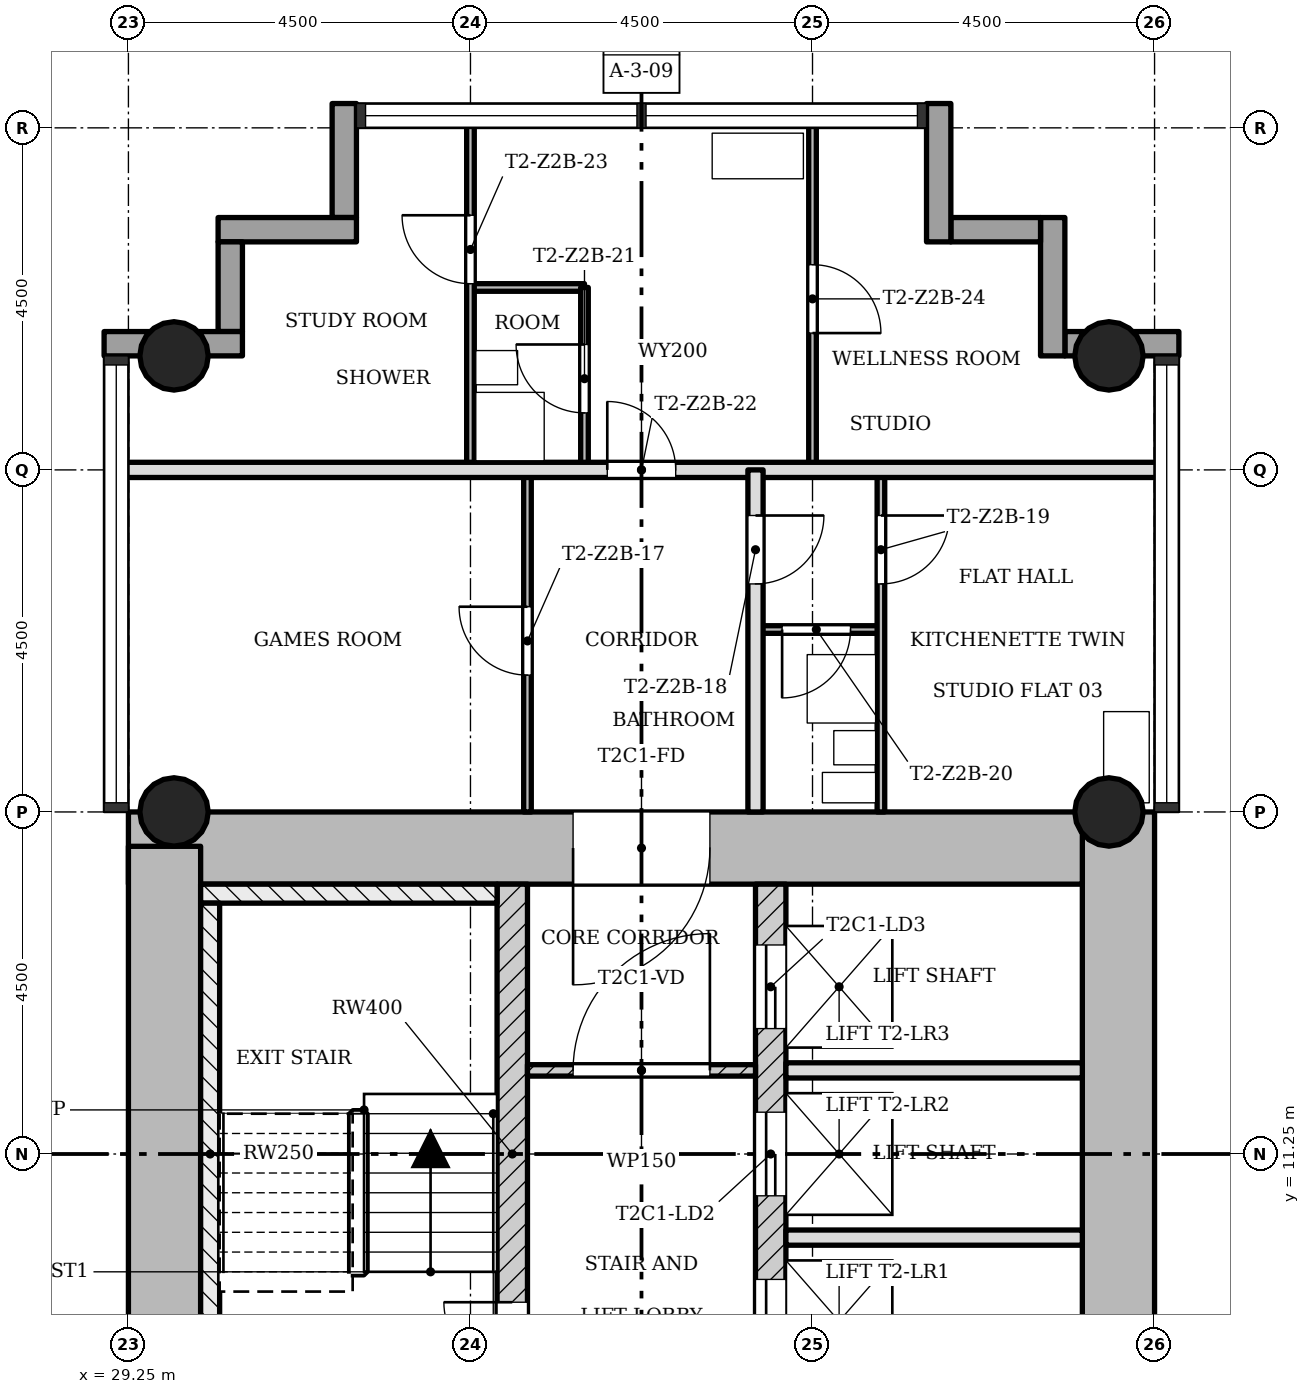
"""IFC4 building model, lengths in metres.
Left out: names, types, materials, properties, quantities, classifications, styles, units other than length and angle.
Written with IfcOpenShell. Run it as: python <this file> out.ifc"""

import sys

from ifc_helpers import new_model, si_unit, direction, frame, frame_2d, origin, origin_2d, place, context, subcontext, project, spatial, rectangle, hollow_circle, extrude, element, fill, save


model = new_model("IFC4")
c1 = context("Model", 3, precision=1e-05, world=origin(), true_north=direction((0.0, 1.0)))
c2 = subcontext(c1, "Body", "Model", "MODEL_VIEW")
j1 = project(units=[si_unit("LENGTHUNIT", "METRE"), si_unit("PLANEANGLEUNIT", "RADIAN")], contexts=[c1])
p1 = place(None, origin())
s1 = spatial("IfcSite", under=j1, at=p1, CompositionType="ELEMENT")
p2 = place(p1, origin())
s2 = spatial("IfcBuilding", under=s1, at=p2, CompositionType="ELEMENT")
p3 = place(p2, frame((0.0, 0.0, 83.4)))
s3 = spatial("IfcBuildingStorey", under=s2, at=p3, CompositionType="ELEMENT", Elevation=83.4)
p4 = place(p3, frame((42.275, 7.7, 0.0), z_axis=(0.0, 0.0, 1.0), x_axis=(0.0, 1.0, 0.0)))
e1 = element("IfcWall", 1, at=p4, inside=s3, PredefinedType="SHEAR", context=c2, shape_type="SweptSolid", body=[
    extrude(rectangle(XDim=8.05, YDim=0.95, at=frame_2d((4.025, 0.0))), origin(), (0.0, 0.0, 1.0), 3.4),
])
p5 = place(p3, frame((41.8, 15.275, 0.0), z_axis=(0.0, 0.0, 1.0), x_axis=(-1.0, 0.0, 0.0)))
e2 = element("IfcWall", 2, at=p5, inside=s3, PredefinedType="SHEAR", context=c2, shape_type="SweptSolid", body=[
    extrude(rectangle(XDim=12.55, YDim=0.95, at=frame_2d((6.275, 0.0))), origin(), (0.0, 0.0, 1.0), 3.4),
])
p6 = place(p5, frame((4.9, 0.0, 0.0)))
e3 = element("IfcOpeningElement", 3, at=p6, cuts=e2, PredefinedType="OPENING", context=c2, shape_type="SweptSolid", body=[
    extrude(rectangle(XDim=1.8, YDim=2.1, at=frame_2d((0.9, 1.05))), frame((0.0, 0.485, 0.0), z_axis=(0.0, -1.0, 0.0), x_axis=(1.0, 0.0, 0.0)), (0.0, 0.0, 1.0), 0.97),
])
p7 = place(p3, frame((29.725, 15.298, 0.0), z_axis=(0.0, 0.0, 1.0), x_axis=(0.0, -1.0, 0.0)))
e4 = element("IfcWall", 4, at=p7, inside=s3, PredefinedType="SHEAR", context=c2, shape_type="SweptSolid", body=[
    extrude(rectangle(XDim=8.696, YDim=0.95, at=frame_2d((4.348, 0.0))), origin(), (0.0, 0.0, 1.0), 3.4),
])
p8 = place(p3, frame((34.3, 7.7, 0.0), z_axis=(0.0, 0.0, 1.0), x_axis=(0.0, 1.0, 0.0)))
e5 = element("IfcWall", 5, at=p8, inside=s3, PredefinedType="SHEAR", context=c2, shape_type="SweptSolid", body=[
    extrude(rectangle(XDim=7.1, YDim=0.4, at=frame_2d((3.55, 0.0))), origin(), (0.0, 0.0, 1.0), 3.4),
])
p9 = place(p8, frame((0.7, 0.0, 0.0)))
e6 = element("IfcOpeningElement", 6, at=p9, cuts=e5, PredefinedType="OPENING", context=c2, shape_type="SweptSolid", body=[
    extrude(rectangle(XDim=0.9, YDim=2.1, at=frame_2d((0.45, 1.05))), frame((0.0, 0.21, 0.0), z_axis=(0.0, -1.0, 0.0), x_axis=(1.0, 0.0, 0.0)), (0.0, 0.0, 1.0), 0.42),
])
p10 = place(p3, frame((37.7, 7.7, 0.0), z_axis=(0.0, 0.0, 1.0), x_axis=(0.0, 1.0, 0.0)))
e7 = element("IfcWall", 7, at=p10, inside=s3, PredefinedType="SHEAR", context=c2, shape_type="SweptSolid", body=[
    extrude(rectangle(XDim=7.1, YDim=0.4, at=frame_2d((3.55, 0.0))), origin(), (0.0, 0.0, 1.0), 3.4),
])
p11 = place(p10, frame((0.8, 0.0, 0.0)))
e8 = element("IfcOpeningElement", 8, at=p11, cuts=e7, PredefinedType="OPENING", context=c2, shape_type="SweptSolid", body=[
    extrude(rectangle(XDim=1.1, YDim=2.1, at=frame_2d((0.55, 1.05))), frame((0.0, 0.21, 0.0), z_axis=(0.0, -1.0, 0.0), x_axis=(1.0, 0.0, 0.0)), (0.0, 0.0, 1.0), 0.42),
])
p12 = place(p10, frame((3.0, 0.0, 0.0)))
e9 = element("IfcOpeningElement", 9, at=p12, cuts=e7, PredefinedType="OPENING", context=c2, shape_type="SweptSolid", body=[
    extrude(rectangle(XDim=1.1, YDim=2.1, at=frame_2d((0.55, 1.05))), frame((0.0, 0.21, 0.0), z_axis=(0.0, -1.0, 0.0), x_axis=(1.0, 0.0, 0.0)), (0.0, 0.0, 1.0), 0.42),
])
p13 = place(p10, frame((5.2, 0.0, 0.0)))
e10 = element("IfcOpeningElement", 10, at=p13, cuts=e7, PredefinedType="OPENING", context=c2, shape_type="SweptSolid", body=[
    extrude(rectangle(XDim=1.1, YDim=2.1, at=frame_2d((0.55, 1.05))), frame((0.0, 0.21, 0.0), z_axis=(0.0, -1.0, 0.0), x_axis=(1.0, 0.0, 0.0)), (0.0, 0.0, 1.0), 0.42),
])
for number, where, z_axis, x_axis in (
    (11, (42.15, 15.75, 0.0), (0.0, 0.0, 1.0), (1.0, 0.0, 0.0)),
    (12, (29.85, 15.75, 0.0), (0.0, 0.0, 1.0), (1.0, 0.0, 0.0)),
    (13, (42.15, 21.75, 0.0), (0.0, 0.0, 1.0), (1.0, 0.0, 0.0)),
    (14, (29.85, 21.75, 0.0), (0.0, 0.0, 1.0), (1.0, 0.0, 0.0)),
):
    element("IfcColumn", number, at=place(p3, frame(where, z_axis=z_axis, x_axis=x_axis)), inside=s3, PredefinedType="COLUMN", context=c2, shape_type="SweptSolid", body=[
        extrude(hollow_circle(Radius=0.45, WallThickness=0.032, at=origin_2d()), origin(), (0.0, 0.0, 1.0), 3.4),
    ])
p14 = place(p3, frame((43.07, 21.91, -0.3), z_axis=(0.0, 0.0, 1.0), x_axis=(-1.0, 0.0, 0.0)))
e15 = element("IfcWall", 15, at=p14, inside=s3, PredefinedType="STANDARD", context=c2, shape_type="SweptSolid", body=[
    extrude(rectangle(XDim=1.5, YDim=0.32, at=frame_2d((0.75, 0.0))), origin(), (0.0, 0.0, 1.0), 3.4),
])
p15 = place(p3, frame((41.41, 21.75, -0.3), z_axis=(0.0, 0.0, 1.0), x_axis=(0.0, 1.0, 0.0)))
e16 = element("IfcWall", 16, at=p15, inside=s3, PredefinedType="STANDARD", context=c2, shape_type="SweptSolid", body=[
    extrude(rectangle(XDim=1.82, YDim=0.32, at=frame_2d((0.91, 0.0))), origin(), (0.0, 0.0, 1.0), 3.4),
])
p16 = place(p3, frame((41.25, 23.41, -0.3), z_axis=(0.0, 0.0, 1.0), x_axis=(-1.0, 0.0, 0.0)))
e17 = element("IfcWall", 17, at=p16, inside=s3, PredefinedType="STANDARD", context=c2, shape_type="SweptSolid", body=[
    extrude(rectangle(XDim=1.18, YDim=0.32, at=frame_2d((0.59, 0.0))), origin(), (0.0, 0.0, 1.0), 3.4),
])
p17 = place(p3, frame((39.91, 23.25, -0.3), z_axis=(0.0, 0.0, 1.0), x_axis=(0.0, 1.0, 0.0)))
e18 = element("IfcWall", 18, at=p17, inside=s3, PredefinedType="STANDARD", context=c2, shape_type="SweptSolid", body=[
    extrude(rectangle(XDim=1.82, YDim=0.32, at=frame_2d((0.91, 0.0))), origin(), (0.0, 0.0, 1.0), 3.4),
])
p18 = place(p3, frame((32.09, 25.07, -0.3), z_axis=(0.0, 0.0, 1.0), x_axis=(0.0, -1.0, 0.0)))
e19 = element("IfcWall", 19, at=p18, inside=s3, PredefinedType="STANDARD", context=c2, shape_type="SweptSolid", body=[
    extrude(rectangle(XDim=1.5, YDim=0.32, at=frame_2d((0.75, 0.0))), origin(), (0.0, 0.0, 1.0), 3.4),
])
p19 = place(p3, frame((32.25, 23.41, -0.3), z_axis=(0.0, 0.0, 1.0), x_axis=(-1.0, 0.0, 0.0)))
e20 = element("IfcWall", 20, at=p19, inside=s3, PredefinedType="STANDARD", context=c2, shape_type="SweptSolid", body=[
    extrude(rectangle(XDim=1.82, YDim=0.32, at=frame_2d((0.91, 0.0))), origin(), (0.0, 0.0, 1.0), 3.4),
])
p20 = place(p3, frame((30.59, 23.25, -0.3), z_axis=(0.0, 0.0, 1.0), x_axis=(0.0, -1.0, 0.0)))
e21 = element("IfcWall", 21, at=p20, inside=s3, PredefinedType="STANDARD", context=c2, shape_type="SweptSolid", body=[
    extrude(rectangle(XDim=1.18, YDim=0.32, at=frame_2d((0.59, 0.0))), origin(), (0.0, 0.0, 1.0), 3.4),
])
p21 = place(p3, frame((30.75, 21.91, -0.3), z_axis=(0.0, 0.0, 1.0), x_axis=(-1.0, 0.0, 0.0)))
e22 = element("IfcWall", 22, at=p21, inside=s3, PredefinedType="STANDARD", context=c2, shape_type="SweptSolid", body=[
    extrude(rectangle(XDim=1.82, YDim=0.32, at=frame_2d((0.91, 0.0))), origin(), (0.0, 0.0, 1.0), 3.4),
])
p22 = place(p3, frame((37.5, 12.35, 0.0), z_axis=(0.0, 0.0, 1.0), x_axis=(-1.0, 0.0, 0.0)))
e23 = element("IfcWall", 23, at=p22, inside=s3, PredefinedType="PARTITIONING", context=c2, shape_type="SweptSolid", body=[
    extrude(rectangle(XDim=3.0, YDim=0.15, at=frame_2d((1.5, 0.0))), origin(), (0.0, 0.0, 1.0), 3.0),
])
p23 = place(p22, frame((0.6, 0.0, 0.0)))
e24 = element("IfcOpeningElement", 24, at=p23, cuts=e23, PredefinedType="OPENING", context=c2, shape_type="SweptSolid", body=[
    extrude(rectangle(XDim=1.8, YDim=2.1, at=frame_2d((0.9, 1.05))), frame((0.0, 0.085, 0.0), z_axis=(0.0, -1.0, 0.0), x_axis=(1.0, 0.0, 0.0)), (0.0, 0.0, 1.0), 0.17),
])
for number, where, z_axis, x_axis in (
    (25, (41.8, 10.15, 0.0), (0.0, 0.0, 1.0), (-1.0, 0.0, 0.0)),
    (26, (41.8, 12.35, 0.0), (0.0, 0.0, 1.0), (-1.0, 0.0, 0.0)),
):
    element("IfcWall", number, at=place(p3, frame(where, z_axis=z_axis, x_axis=x_axis)), inside=s3, PredefinedType="SOLIDWALL", context=c2, shape_type="SweptSolid", body=[
        extrude(rectangle(XDim=3.9, YDim=0.2, at=frame_2d((1.95, 0.0))), origin(), (0.0, 0.0, 1.0), 3.0),
    ])
p24 = place(p3, frame((39.15, 18.15, 0.0), z_axis=(0.0, 0.0, 1.0), x_axis=(-1.0, 0.0, 0.0)))
e27 = element("IfcWall", 27, at=p24, inside=s3, PredefinedType="PARTITIONING", context=c2, shape_type="SweptSolid", body=[
    extrude(rectangle(XDim=1.65, YDim=0.1, at=frame_2d((0.825, 0.0))), origin(), (0.0, 0.0, 1.0), 3.0),
])
p25 = place(p24, frame((0.4, 0.0, 0.0)))
e28 = element("IfcOpeningElement", 28, at=p25, cuts=e27, PredefinedType="OPENING", context=c2, shape_type="SweptSolid", body=[
    extrude(rectangle(XDim=0.9, YDim=2.1, at=frame_2d((0.45, 1.05))), frame((0.0, 0.06, 0.0), z_axis=(0.0, -1.0, 0.0), x_axis=(1.0, 0.0, 0.0)), (0.0, 0.0, 1.0), 0.12),
])
p26 = place(p3, frame((42.85, 20.25, 0.0), z_axis=(0.0, 0.0, 1.0), x_axis=(-1.0, 0.0, 0.0)))
e29 = element("IfcWall", 29, at=p26, inside=s3, PredefinedType="SOLIDWALL", context=c2, shape_type="SweptSolid", body=[
    extrude(rectangle(XDim=13.7, YDim=0.2, at=frame_2d((6.85, 0.0))), origin(), (0.0, 0.0, 1.0), 3.0),
])
p27 = place(p26, frame((6.4, 0.0, 0.0)))
e30 = element("IfcOpeningElement", 30, at=p27, cuts=e29, PredefinedType="OPENING", context=c2, shape_type="SweptSolid", body=[
    extrude(rectangle(XDim=0.9, YDim=2.1, at=frame_2d((0.45, 1.05))), frame((0.0, 0.11, 0.0), z_axis=(0.0, -1.0, 0.0), x_axis=(1.0, 0.0, 0.0)), (0.0, 0.0, 1.0), 0.22),
])
p28 = place(p3, frame((35.25, 22.65, 0.0), z_axis=(0.0, 0.0, 1.0), x_axis=(-1.0, 0.0, 0.0)))
e31 = element("IfcWall", 31, at=p28, inside=s3, PredefinedType="PARTITIONING", context=c2, shape_type="SweptSolid", body=[
    extrude(rectangle(XDim=1.5, YDim=0.1, at=frame_2d((0.75, 0.0))), origin(), (0.0, 0.0, 1.0), 3.0),
])
p29 = place(p3, frame((39.15, 15.75, 0.0), z_axis=(0.0, 0.0, 1.0), x_axis=(0.0, 1.0, 0.0)))
e32 = element("IfcWall", 32, at=p29, inside=s3, PredefinedType="PARTITIONING", context=c2, shape_type="SweptSolid", body=[
    extrude(rectangle(XDim=4.5, YDim=0.1, at=frame_2d((2.25, 0.0))), origin(), (0.0, 0.0, 1.0), 3.0),
])
p30 = place(p29, frame((3.0, 0.0, 0.0)))
e33 = element("IfcOpeningElement", 33, at=p30, cuts=e32, PredefinedType="OPENING", context=c2, shape_type="SweptSolid", body=[
    extrude(rectangle(XDim=0.9, YDim=2.1, at=frame_2d((0.45, 1.05))), frame((0.0, 0.06, 0.0), z_axis=(0.0, -1.0, 0.0), x_axis=(1.0, 0.0, 0.0)), (0.0, 0.0, 1.0), 0.12),
])
p31 = place(p3, frame((38.25, 20.25, 0.0), z_axis=(0.0, 0.0, 1.0), x_axis=(0.0, 1.0, 0.0)))
e34 = element("IfcWall", 34, at=p31, inside=s3, PredefinedType="PARTITIONING", context=c2, shape_type="SweptSolid", body=[
    extrude(rectangle(XDim=4.6, YDim=0.1, at=frame_2d((2.3, 0.0))), origin(), (0.0, 0.0, 1.0), 3.0),
])
p32 = place(p31, frame((1.8, 0.0, 0.0)))
e35 = element("IfcOpeningElement", 35, at=p32, cuts=e34, PredefinedType="OPENING", context=c2, shape_type="SweptSolid", body=[
    extrude(rectangle(XDim=0.9, YDim=2.1, at=frame_2d((0.45, 1.05))), frame((0.0, 0.06, 0.0), z_axis=(0.0, -1.0, 0.0), x_axis=(1.0, 0.0, 0.0)), (0.0, 0.0, 1.0), 0.12),
])
p33 = place(p3, frame((37.5, 15.75, 0.0), z_axis=(0.0, 0.0, 1.0), x_axis=(0.0, 1.0, 0.0)))
e36 = element("IfcWall", 36, at=p33, inside=s3, PredefinedType="SOLIDWALL", context=c2, shape_type="SweptSolid", body=[
    extrude(rectangle(XDim=4.5, YDim=0.2, at=frame_2d((2.25, 0.0))), origin(), (0.0, 0.0, 1.0), 3.0),
])
p34 = place(p33, frame((3.0, 0.0, 0.0)))
e37 = element("IfcOpeningElement", 37, at=p34, cuts=e36, PredefinedType="OPENING", context=c2, shape_type="SweptSolid", body=[
    extrude(rectangle(XDim=0.9, YDim=2.1, at=frame_2d((0.45, 1.05))), frame((0.0, 0.11, 0.0), z_axis=(0.0, -1.0, 0.0), x_axis=(1.0, 0.0, 0.0)), (0.0, 0.0, 1.0), 0.22),
])
p35 = place(p3, frame((35.25, 20.25, 0.0), z_axis=(0.0, 0.0, 1.0), x_axis=(0.0, 1.0, 0.0)))
e38 = element("IfcWall", 38, at=p35, inside=s3, PredefinedType="PARTITIONING", context=c2, shape_type="SweptSolid", body=[
    extrude(rectangle(XDim=2.4, YDim=0.1, at=frame_2d((1.2, 0.0))), origin(), (0.0, 0.0, 1.0), 3.0),
])
p36 = place(p35, frame((0.75, 0.0, 0.0)))
e39 = element("IfcOpeningElement", 39, at=p36, cuts=e38, PredefinedType="OPENING", context=c2, shape_type="SweptSolid", body=[
    extrude(rectangle(XDim=0.9, YDim=2.1, at=frame_2d((0.45, 1.05))), frame((0.0, 0.06, 0.0), z_axis=(0.0, -1.0, 0.0), x_axis=(1.0, 0.0, 0.0)), (0.0, 0.0, 1.0), 0.12),
])
p37 = place(p3, frame((34.5, 15.75, 0.0), z_axis=(0.0, 0.0, 1.0), x_axis=(0.0, 1.0, 0.0)))
e40 = element("IfcWall", 40, at=p37, inside=s3, PredefinedType="PARTITIONING", context=c2, shape_type="SweptSolid", body=[
    extrude(rectangle(XDim=4.5, YDim=0.1, at=frame_2d((2.25, 0.0))), origin(), (0.0, 0.0, 1.0), 3.0),
])
p38 = place(p37, frame((1.8, 0.0, 0.0)))
e41 = element("IfcOpeningElement", 41, at=p38, cuts=e40, PredefinedType="OPENING", context=c2, shape_type="SweptSolid", body=[
    extrude(rectangle(XDim=0.9, YDim=2.1, at=frame_2d((0.45, 1.05))), frame((0.0, 0.06, 0.0), z_axis=(0.0, -1.0, 0.0), x_axis=(1.0, 0.0, 0.0)), (0.0, 0.0, 1.0), 0.12),
])
p39 = place(p3, frame((33.75, 20.25, 0.0), z_axis=(0.0, 0.0, 1.0), x_axis=(0.0, 1.0, 0.0)))
e42 = element("IfcWall", 42, at=p39, inside=s3, PredefinedType="PARTITIONING", context=c2, shape_type="SweptSolid", body=[
    extrude(rectangle(XDim=4.6, YDim=0.1, at=frame_2d((2.3, 0.0))), origin(), (0.0, 0.0, 1.0), 3.0),
])
p40 = place(p39, frame((2.45, 0.0, 0.0)))
e43 = element("IfcOpeningElement", 43, at=p40, cuts=e42, PredefinedType="OPENING", context=c2, shape_type="SweptSolid", body=[
    extrude(rectangle(XDim=0.9, YDim=2.1, at=frame_2d((0.45, 1.05))), frame((0.0, 0.06, 0.0), z_axis=(0.0, -1.0, 0.0), x_axis=(1.0, 0.0, 0.0)), (0.0, 0.0, 1.0), 0.12),
])
p41 = place(p3, frame((34.1, 14.675, 0.0), z_axis=(0.0, 0.0, 1.0), x_axis=(-1.0, 0.0, 0.0)))
e44 = element("IfcWall", 44, at=p41, inside=s3, PredefinedType="SHEAR", context=c2, shape_type="SweptSolid", body=[
    extrude(rectangle(XDim=3.9, YDim=0.25, at=frame_2d((1.95, 0.0))), origin(), (0.0, 0.0, 1.0), 3.4),
])
p42 = place(p3, frame((30.325, 7.95, 0.0), z_axis=(0.0, 0.0, 1.0), x_axis=(0.0, 1.0, 0.0)))
e45 = element("IfcWall", 45, at=p42, inside=s3, PredefinedType="SHEAR", context=c2, shape_type="SweptSolid", body=[
    extrude(rectangle(XDim=6.6, YDim=0.25, at=frame_2d((3.3, 0.0))), origin(), (0.0, 0.0, 1.0), 3.4),
])
p43 = place(p23, origin())
e46 = element("IfcDoor", 46, at=p43, inside=s3, OperationType="SINGLE_SWING_LEFT", PredefinedType="DOOR", context=c2, shape_type="SweptSolid", body=[
    extrude(rectangle(XDim=1.8, YDim=2.1, at=frame_2d((0.9, 1.05))), frame((0.0, 0.025, 0.0), z_axis=(0.0, -1.0, 0.0), x_axis=(1.0, 0.0, 0.0)), (0.0, 0.0, 1.0), 0.05),
])
fill(e24, e46)
p44 = place(p38, origin())
e47 = element("IfcDoor", 47, at=p44, inside=s3, OperationType="SINGLE_SWING_LEFT", PredefinedType="DOOR", context=c2, shape_type="SweptSolid", body=[
    extrude(rectangle(XDim=0.9, YDim=2.1, at=frame_2d((0.45, 1.05))), frame((0.0, 0.025, 0.0), z_axis=(0.0, -1.0, 0.0), x_axis=(1.0, 0.0, 0.0)), (0.0, 0.0, 1.0), 0.05),
])
fill(e41, e47)
p45 = place(p34, origin())
e48 = element("IfcDoor", 48, at=p45, inside=s3, OperationType="SINGLE_SWING_RIGHT", PredefinedType="DOOR", context=c2, shape_type="SweptSolid", body=[
    extrude(rectangle(XDim=0.9, YDim=2.1, at=frame_2d((0.45, 1.05))), frame((0.0, 0.025, 0.0), z_axis=(0.0, -1.0, 0.0), x_axis=(1.0, 0.0, 0.0)), (0.0, 0.0, 1.0), 0.05),
])
fill(e37, e48)
p46 = place(p30, origin())
e49 = element("IfcDoor", 49, at=p46, inside=s3, OperationType="SINGLE_SWING_RIGHT", PredefinedType="DOOR", context=c2, shape_type="SweptSolid", body=[
    extrude(rectangle(XDim=0.9, YDim=2.1, at=frame_2d((0.45, 1.05))), frame((0.0, 0.025, 0.0), z_axis=(0.0, -1.0, 0.0), x_axis=(1.0, 0.0, 0.0)), (0.0, 0.0, 1.0), 0.05),
])
fill(e33, e49)
p47 = place(p25, origin())
e50 = element("IfcDoor", 50, at=p47, inside=s3, OperationType="SINGLE_SWING_LEFT", PredefinedType="DOOR", context=c2, shape_type="SweptSolid", body=[
    extrude(rectangle(XDim=0.9, YDim=2.1, at=frame_2d((0.45, 1.05))), frame((0.0, 0.025, 0.0), z_axis=(0.0, -1.0, 0.0), x_axis=(1.0, 0.0, 0.0)), (0.0, 0.0, 1.0), 0.05),
])
fill(e28, e50)
p48 = place(p36, origin())
e51 = element("IfcDoor", 51, at=p48, inside=s3, OperationType="SINGLE_SWING_LEFT", PredefinedType="DOOR", context=c2, shape_type="SweptSolid", body=[
    extrude(rectangle(XDim=0.9, YDim=2.1, at=frame_2d((0.45, 1.05))), frame((0.0, 0.025, 0.0), z_axis=(0.0, -1.0, 0.0), x_axis=(1.0, 0.0, 0.0)), (0.0, 0.0, 1.0), 0.05),
])
fill(e39, e51)
p49 = place(p27, origin())
e52 = element("IfcDoor", 52, at=p49, inside=s3, OperationType="SINGLE_SWING_RIGHT", PredefinedType="DOOR", context=c2, shape_type="SweptSolid", body=[
    extrude(rectangle(XDim=0.9, YDim=2.1, at=frame_2d((0.45, 1.05))), frame((0.0, 0.025, 0.0), z_axis=(0.0, -1.0, 0.0), x_axis=(1.0, 0.0, 0.0)), (0.0, 0.0, 1.0), 0.05),
])
fill(e30, e52)
p50 = place(p40, origin())
e53 = element("IfcDoor", 53, at=p50, inside=s3, OperationType="SINGLE_SWING_LEFT", PredefinedType="DOOR", context=c2, shape_type="SweptSolid", body=[
    extrude(rectangle(XDim=0.9, YDim=2.1, at=frame_2d((0.45, 1.05))), frame((0.0, 0.025, 0.0), z_axis=(0.0, -1.0, 0.0), x_axis=(1.0, 0.0, 0.0)), (0.0, 0.0, 1.0), 0.05),
])
fill(e43, e53)
p51 = place(p32, origin())
e54 = element("IfcDoor", 54, at=p51, inside=s3, OperationType="SINGLE_SWING_LEFT", PredefinedType="DOOR", context=c2, shape_type="SweptSolid", body=[
    extrude(rectangle(XDim=0.9, YDim=2.1, at=frame_2d((0.45, 1.05))), frame((0.0, 0.025, 0.0), z_axis=(0.0, -1.0, 0.0), x_axis=(1.0, 0.0, 0.0)), (0.0, 0.0, 1.0), 0.05),
])
fill(e35, e54)
p52 = place(p9, origin())
e55 = element("IfcDoor", 55, at=p52, inside=s3, OperationType="SINGLE_SWING_LEFT", PredefinedType="DOOR", context=c2, shape_type="SweptSolid", body=[
    extrude(rectangle(XDim=0.9, YDim=2.1, at=frame_2d((0.45, 1.05))), frame((0.0, 0.025, 0.0), z_axis=(0.0, -1.0, 0.0), x_axis=(1.0, 0.0, 0.0)), (0.0, 0.0, 1.0), 0.05),
])
fill(e6, e55)
p53 = place(p11, origin())
e56 = element("IfcDoor", 56, at=p53, inside=s3, OperationType="SLIDING_TO_LEFT", PredefinedType="DOOR", context=c2, shape_type="SweptSolid", body=[
    extrude(rectangle(XDim=1.1, YDim=2.1, at=frame_2d((0.55, 1.05))), frame((0.0, 0.025, 0.0), z_axis=(0.0, -1.0, 0.0), x_axis=(1.0, 0.0, 0.0)), (0.0, 0.0, 1.0), 0.05),
])
fill(e8, e56)
p54 = place(p12, origin())
e57 = element("IfcDoor", 57, at=p54, inside=s3, OperationType="SLIDING_TO_LEFT", PredefinedType="DOOR", context=c2, shape_type="SweptSolid", body=[
    extrude(rectangle(XDim=1.1, YDim=2.1, at=frame_2d((0.55, 1.05))), frame((0.0, 0.025, 0.0), z_axis=(0.0, -1.0, 0.0), x_axis=(1.0, 0.0, 0.0)), (0.0, 0.0, 1.0), 0.05),
])
fill(e9, e57)
p55 = place(p13, origin())
e58 = element("IfcDoor", 58, at=p55, inside=s3, OperationType="SLIDING_TO_LEFT", PredefinedType="DOOR", context=c2, shape_type="SweptSolid", body=[
    extrude(rectangle(XDim=1.1, YDim=2.1, at=frame_2d((0.55, 1.05))), frame((0.0, 0.025, 0.0), z_axis=(0.0, -1.0, 0.0), x_axis=(1.0, 0.0, 0.0)), (0.0, 0.0, 1.0), 0.05),
])
fill(e10, e58)
p56 = place(p6, origin())
e59 = element("IfcDoor", 59, at=p56, inside=s3, OperationType="SINGLE_SWING_LEFT", PredefinedType="DOOR", context=c2, shape_type="SweptSolid", body=[
    extrude(rectangle(XDim=1.8, YDim=2.1, at=frame_2d((0.9, 1.05))), frame((0.0, 0.025, 0.0), z_axis=(0.0, -1.0, 0.0), x_axis=(1.0, 0.0, 0.0)), (0.0, 0.0, 1.0), 0.05),
])
fill(e3, e59)
save(model, sys.argv[1])
